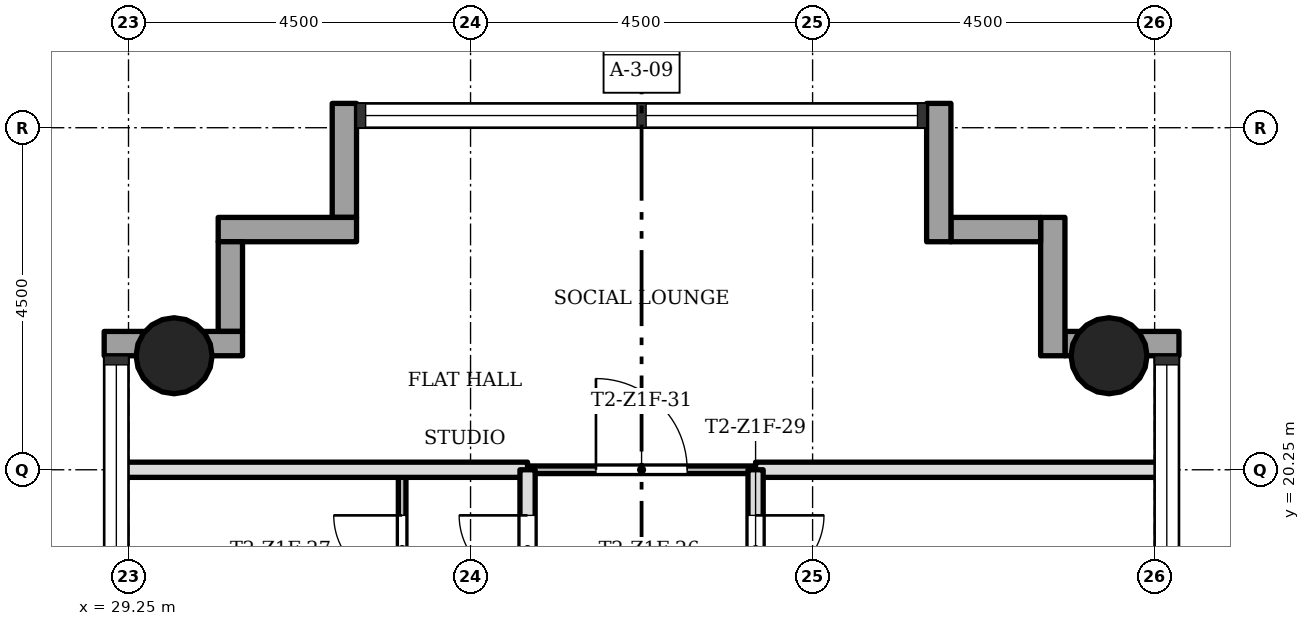
"""IFC4 building model, lengths in metres.
Left out: names, types, materials, properties, quantities, classifications, styles, units other than length and angle.
Written with IfcOpenShell. Run it as: python <this file> out.ifc"""

import sys

from ifc_helpers import new_model, si_unit, direction, frame, frame_2d, origin, origin_2d, place, context, subcontext, project, spatial, rectangle, hollow_circle, extrude, element, fill, save


model = new_model("IFC4")
c1 = context("Model", 3, precision=1e-05, world=origin(), true_north=direction((0.0, 1.0)))
c2 = subcontext(c1, "Body", "Model", "MODEL_VIEW")
j1 = project(units=[si_unit("LENGTHUNIT", "METRE"), si_unit("PLANEANGLEUNIT", "RADIAN")], contexts=[c1])
p1 = place(None, origin())
s1 = spatial("IfcSite", under=j1, at=p1, CompositionType="ELEMENT")
p2 = place(p1, origin())
s2 = spatial("IfcBuilding", under=s1, at=p2, CompositionType="ELEMENT")
p3 = place(p2, frame((0.0, 0.0, 68.7)))
s3 = spatial("IfcBuildingStorey", under=s2, at=p3, CompositionType="ELEMENT", Elevation=68.7)
for number, where, z_axis, x_axis in (
    (1, (42.15, 21.75, 0.0), (0.0, 0.0, 1.0), (1.0, 0.0, 0.0)),
    (2, (29.85, 21.75, 0.0), (0.0, 0.0, 1.0), (1.0, 0.0, 0.0)),
):
    element("IfcColumn", number, at=place(p3, frame(where, z_axis=z_axis, x_axis=x_axis)), inside=s3, PredefinedType="COLUMN", context=c2, shape_type="SweptSolid", body=[
        extrude(hollow_circle(Radius=0.5, WallThickness=0.036, at=origin_2d()), origin(), (0.0, 0.0, 1.0), 3.4),
    ])
p4 = place(p3, frame((43.07, 21.91, -0.3), z_axis=(0.0, 0.0, 1.0), x_axis=(-1.0, 0.0, 0.0)))
e3 = element("IfcWall", 3, at=p4, inside=s3, PredefinedType="STANDARD", context=c2, shape_type="SweptSolid", body=[
    extrude(rectangle(XDim=1.5, YDim=0.32, at=frame_2d((0.75, 0.0))), origin(), (0.0, 0.0, 1.0), 3.4),
])
p5 = place(p3, frame((41.41, 21.75, -0.3), z_axis=(0.0, 0.0, 1.0), x_axis=(0.0, 1.0, 0.0)))
e4 = element("IfcWall", 4, at=p5, inside=s3, PredefinedType="STANDARD", context=c2, shape_type="SweptSolid", body=[
    extrude(rectangle(XDim=1.82, YDim=0.32, at=frame_2d((0.91, 0.0))), origin(), (0.0, 0.0, 1.0), 3.4),
])
p6 = place(p3, frame((41.25, 23.41, -0.3), z_axis=(0.0, 0.0, 1.0), x_axis=(-1.0, 0.0, 0.0)))
e5 = element("IfcWall", 5, at=p6, inside=s3, PredefinedType="STANDARD", context=c2, shape_type="SweptSolid", body=[
    extrude(rectangle(XDim=1.18, YDim=0.32, at=frame_2d((0.59, 0.0))), origin(), (0.0, 0.0, 1.0), 3.4),
])
p7 = place(p3, frame((39.91, 23.25, -0.3), z_axis=(0.0, 0.0, 1.0), x_axis=(0.0, 1.0, 0.0)))
e6 = element("IfcWall", 6, at=p7, inside=s3, PredefinedType="STANDARD", context=c2, shape_type="SweptSolid", body=[
    extrude(rectangle(XDim=1.82, YDim=0.32, at=frame_2d((0.91, 0.0))), origin(), (0.0, 0.0, 1.0), 3.4),
])
p8 = place(p3, frame((32.09, 25.07, -0.3), z_axis=(0.0, 0.0, 1.0), x_axis=(0.0, -1.0, 0.0)))
e7 = element("IfcWall", 7, at=p8, inside=s3, PredefinedType="STANDARD", context=c2, shape_type="SweptSolid", body=[
    extrude(rectangle(XDim=1.5, YDim=0.32, at=frame_2d((0.75, 0.0))), origin(), (0.0, 0.0, 1.0), 3.4),
])
p9 = place(p3, frame((32.25, 23.41, -0.3), z_axis=(0.0, 0.0, 1.0), x_axis=(-1.0, 0.0, 0.0)))
e8 = element("IfcWall", 8, at=p9, inside=s3, PredefinedType="STANDARD", context=c2, shape_type="SweptSolid", body=[
    extrude(rectangle(XDim=1.82, YDim=0.32, at=frame_2d((0.91, 0.0))), origin(), (0.0, 0.0, 1.0), 3.4),
])
p10 = place(p3, frame((30.59, 23.25, -0.3), z_axis=(0.0, 0.0, 1.0), x_axis=(0.0, -1.0, 0.0)))
e9 = element("IfcWall", 9, at=p10, inside=s3, PredefinedType="STANDARD", context=c2, shape_type="SweptSolid", body=[
    extrude(rectangle(XDim=1.18, YDim=0.32, at=frame_2d((0.59, 0.0))), origin(), (0.0, 0.0, 1.0), 3.4),
])
p11 = place(p3, frame((30.75, 21.91, -0.3), z_axis=(0.0, 0.0, 1.0), x_axis=(-1.0, 0.0, 0.0)))
e10 = element("IfcWall", 10, at=p11, inside=s3, PredefinedType="STANDARD", context=c2, shape_type="SweptSolid", body=[
    extrude(rectangle(XDim=1.82, YDim=0.32, at=frame_2d((0.91, 0.0))), origin(), (0.0, 0.0, 1.0), 3.4),
])
p12 = place(p3, frame((37.5, 20.25, 0.0), z_axis=(0.0, 0.0, 1.0), x_axis=(-1.0, 0.0, 0.0)))
e11 = element("IfcWall", 11, at=p12, inside=s3, PredefinedType="PARTITIONING", context=c2, shape_type="SweptSolid", body=[
    extrude(rectangle(XDim=3.0, YDim=0.1, at=frame_2d((1.5, 0.0))), origin(), (0.0, 0.0, 1.0), 3.0),
])
p13 = place(p12, frame((0.9, 0.0, 0.0)))
e12 = element("IfcOpeningElement", 12, at=p13, cuts=e11, PredefinedType="OPENING", context=c2, shape_type="SweptSolid", body=[
    extrude(rectangle(XDim=1.2, YDim=2.1, at=frame_2d((0.6, 1.05))), frame((0.0, 0.06, 0.0), z_axis=(0.0, -1.0, 0.0), x_axis=(1.0, 0.0, 0.0)), (0.0, 0.0, 1.0), 0.12),
])
for number, where, z_axis, x_axis in (
    (13, (42.85, 20.25, 0.0), (0.0, 0.0, 1.0), (-1.0, 0.0, 0.0)),
    (14, (34.5, 20.25, 0.0), (0.0, 0.0, 1.0), (-1.0, 0.0, 0.0)),
):
    element("IfcWall", number, at=place(p3, frame(where, z_axis=z_axis, x_axis=x_axis)), inside=s3, PredefinedType="SOLIDWALL", context=c2, shape_type="SweptSolid", body=[
        extrude(rectangle(XDim=5.35, YDim=0.2, at=frame_2d((2.675, 0.0))), origin(), (0.0, 0.0, 1.0), 3.0),
    ])
p14 = place(p3, frame((37.5, 15.75, 0.0), z_axis=(0.0, 0.0, 1.0), x_axis=(0.0, 1.0, 0.0)))
e15 = element("IfcWall", 15, at=p14, inside=s3, PredefinedType="SOLIDWALL", context=c2, shape_type="SweptSolid", body=[
    extrude(rectangle(XDim=4.5, YDim=0.2, at=frame_2d((2.25, 0.0))), origin(), (0.0, 0.0, 1.0), 3.0),
])
p15 = place(p14, frame((3.0, 0.0, 0.0)))
e16 = element("IfcOpeningElement", 16, at=p15, cuts=e15, PredefinedType="OPENING", context=c2, shape_type="SweptSolid", body=[
    extrude(rectangle(XDim=0.9, YDim=2.1, at=frame_2d((0.45, 1.05))), frame((0.0, 0.11, 0.0), z_axis=(0.0, -1.0, 0.0), x_axis=(1.0, 0.0, 0.0)), (0.0, 0.0, 1.0), 0.22),
])
p16 = place(p3, frame((34.5, 15.75, 0.0), z_axis=(0.0, 0.0, 1.0), x_axis=(0.0, 1.0, 0.0)))
e17 = element("IfcWall", 17, at=p16, inside=s3, PredefinedType="SOLIDWALL", context=c2, shape_type="SweptSolid", body=[
    extrude(rectangle(XDim=4.5, YDim=0.2, at=frame_2d((2.25, 0.0))), origin(), (0.0, 0.0, 1.0), 3.0),
])
p17 = place(p16, frame((3.0, 0.0, 0.0)))
e18 = element("IfcOpeningElement", 18, at=p17, cuts=e17, PredefinedType="OPENING", context=c2, shape_type="SweptSolid", body=[
    extrude(rectangle(XDim=0.9, YDim=2.1, at=frame_2d((0.45, 1.05))), frame((0.0, 0.11, 0.0), z_axis=(0.0, -1.0, 0.0), x_axis=(1.0, 0.0, 0.0)), (0.0, 0.0, 1.0), 0.22),
])
p18 = place(p3, frame((32.85, 15.75, 0.0), z_axis=(0.0, 0.0, 1.0), x_axis=(0.0, 1.0, 0.0)))
e19 = element("IfcWall", 19, at=p18, inside=s3, PredefinedType="PARTITIONING", context=c2, shape_type="SweptSolid", body=[
    extrude(rectangle(XDim=4.5, YDim=0.1, at=frame_2d((2.25, 0.0))), origin(), (0.0, 0.0, 1.0), 3.0),
])
p19 = place(p18, frame((3.0, 0.0, 0.0)))
e20 = element("IfcOpeningElement", 20, at=p19, cuts=e19, PredefinedType="OPENING", context=c2, shape_type="SweptSolid", body=[
    extrude(rectangle(XDim=0.9, YDim=2.1, at=frame_2d((0.45, 1.05))), frame((0.0, 0.06, 0.0), z_axis=(0.0, -1.0, 0.0), x_axis=(1.0, 0.0, 0.0)), (0.0, 0.0, 1.0), 0.12),
])
p20 = place(p17, origin())
e21 = element("IfcDoor", 21, at=p20, inside=s3, OperationType="SINGLE_SWING_LEFT", PredefinedType="DOOR", context=c2, shape_type="SweptSolid", body=[
    extrude(rectangle(XDim=0.9, YDim=2.1, at=frame_2d((0.45, 1.05))), frame((0.0, 0.025, 0.0), z_axis=(0.0, -1.0, 0.0), x_axis=(1.0, 0.0, 0.0)), (0.0, 0.0, 1.0), 0.05),
])
fill(e18, e21)
p21 = place(p19, origin())
e22 = element("IfcDoor", 22, at=p21, inside=s3, OperationType="SINGLE_SWING_LEFT", PredefinedType="DOOR", context=c2, shape_type="SweptSolid", body=[
    extrude(rectangle(XDim=0.9, YDim=2.1, at=frame_2d((0.45, 1.05))), frame((0.0, 0.025, 0.0), z_axis=(0.0, -1.0, 0.0), x_axis=(1.0, 0.0, 0.0)), (0.0, 0.0, 1.0), 0.05),
])
fill(e20, e22)
p22 = place(p15, origin())
e23 = element("IfcDoor", 23, at=p22, inside=s3, OperationType="SINGLE_SWING_RIGHT", PredefinedType="DOOR", context=c2, shape_type="SweptSolid", body=[
    extrude(rectangle(XDim=0.9, YDim=2.1, at=frame_2d((0.45, 1.05))), frame((0.0, 0.025, 0.0), z_axis=(0.0, -1.0, 0.0), x_axis=(1.0, 0.0, 0.0)), (0.0, 0.0, 1.0), 0.05),
])
fill(e16, e23)
p23 = place(p13, origin())
e24 = element("IfcDoor", 24, at=p23, inside=s3, OperationType="SINGLE_SWING_RIGHT", PredefinedType="DOOR", context=c2, shape_type="SweptSolid", body=[
    extrude(rectangle(XDim=1.2, YDim=2.1, at=frame_2d((0.6, 1.05))), frame((0.0, 0.025, 0.0), z_axis=(0.0, -1.0, 0.0), x_axis=(1.0, 0.0, 0.0)), (0.0, 0.0, 1.0), 0.05),
])
fill(e12, e24)
save(model, sys.argv[1])
